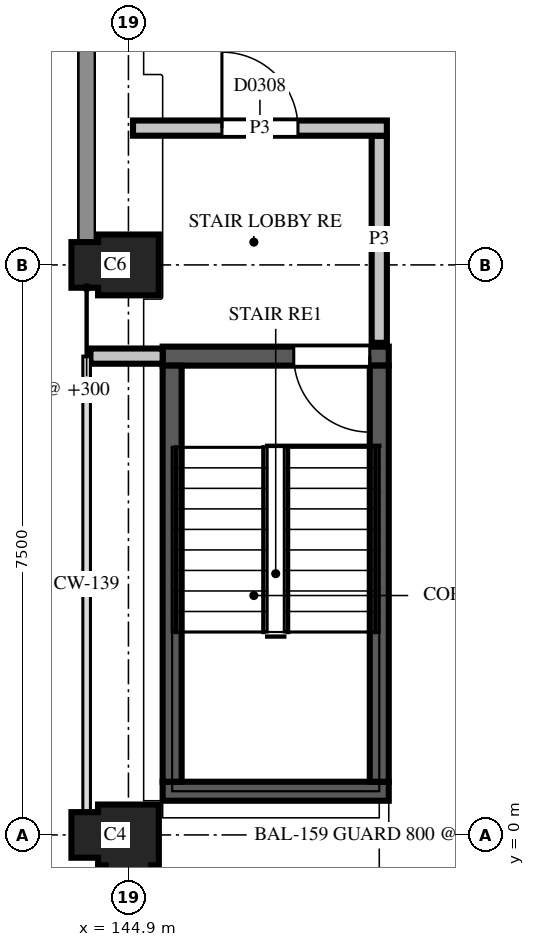
"""IFC4 building model, lengths in metres.
Left out: names, types, materials, properties, quantities, classifications, styles, units other than length and angle.
Written with IfcOpenShell. Run it as: python <this file> out.ifc"""

import sys

from ifc_helpers import new_model, si_unit, direction, frame, frame_2d, origin, place, context, subcontext, project, spatial, polyline, rectangle, outline, extrude, element, fill, save


model = new_model("IFC4")
c1 = context("Model", 3, precision=1e-05, world=origin(), true_north=direction((0.0, 1.0)))
c2 = subcontext(c1, "Body", "Model", "MODEL_VIEW")
j1 = project(units=[si_unit("LENGTHUNIT", "METRE"), si_unit("PLANEANGLEUNIT", "RADIAN")], contexts=[c1])
p1 = place(None, origin())
s1 = spatial("IfcSite", under=j1, at=p1, CompositionType="ELEMENT")
p2 = place(p1, origin())
s2 = spatial("IfcBuilding", under=s1, at=p2, CompositionType="ELEMENT")
p3 = place(p2, frame((0.0, 0.0, 11.9)))
s3 = spatial("IfcBuildingStorey", under=s2, at=p3, CompositionType="ELEMENT", Elevation=11.9)
p4 = place(p3, frame((144.9, 0.0, 0.0), z_axis=(0.0, 0.0, 1.0), x_axis=(-1.0, 0.0, 0.0)))
e1 = element("IfcColumn", 1, at=p4, inside=s3, PredefinedType="COLUMN", context=c2, shape_type="SweptSolid", body=[
    extrude(outline(polyline([(-0.4, -0.4), (0.4, -0.4), (0.4, -0.3), (0.75, -0.3), (0.75, 0.3), (0.4, 0.3), (0.4, 0.4), (0.3, 0.4), (0.3, 0.75), (-0.3, 0.75), (-0.3, 0.4), (-0.4, 0.4), (-0.4, -0.4)])), origin(), (0.0, 0.0, 1.0), 3.7),
])
p5 = place(p3, frame((144.9, 7.5, 0.0), z_axis=(0.0, 0.0, 1.0), x_axis=(-1.0, 0.0, 0.0)))
e2 = element("IfcColumn", 2, at=p5, inside=s3, PredefinedType="COLUMN", context=c2, shape_type="SweptSolid", body=[
    extrude(outline(polyline([(-0.4, -0.4), (0.4, -0.4), (0.4, -0.3), (0.75, -0.3), (0.75, 0.3), (0.4, 0.3), (0.4, 0.4), (-0.4, 0.4), (-0.4, -0.4)])), origin(), (0.0, 0.0, 1.0), 3.7),
])
p6 = place(p3, frame((145.35, 0.575, 0.0), z_axis=(0.0, 0.0, 1.0), x_axis=(1.0, 0.0, 0.0)))
e3 = element("IfcWall", 3, at=p6, inside=s3, PredefinedType="SHEAR", context=c2, shape_type="SweptSolid", body=[
    extrude(rectangle(XDim=2.975, YDim=0.25, at=frame_2d((1.487, 0.0))), origin(), (0.0, 0.0, 1.0), 3.7),
])
p7 = place(p3, frame((145.35, 6.3, 0.0), z_axis=(0.0, 0.0, 1.0), x_axis=(1.0, 0.0, 0.0)))
e4 = element("IfcWall", 4, at=p7, inside=s3, PredefinedType="SHEAR", context=c2, shape_type="SweptSolid", body=[
    extrude(rectangle(XDim=2.975, YDim=0.25, at=frame_2d((1.487, 0.0))), origin(), (0.0, 0.0, 1.0), 3.7),
])
p8 = place(p7, frame((1.725, 0.0, 0.0)))
e5 = element("IfcOpeningElement", 5, at=p8, cuts=e4, PredefinedType="OPENING", context=c2, shape_type="SweptSolid", body=[
    extrude(rectangle(XDim=1.0, YDim=2.1, at=frame_2d((0.5, 1.05))), frame((0.0, 0.135, 0.0), z_axis=(0.0, -1.0, 0.0), x_axis=(1.0, 0.0, 0.0)), (0.0, 0.0, 1.0), 0.27),
])
for number, where, z_axis, x_axis in (
    (6, (145.475, 0.7, 0.0), (0.0, 0.0, 1.0), (0.0, 1.0, 0.0)),
    (7, (148.2, 0.7, 0.0), (0.0, 0.0, 1.0), (0.0, 1.0, 0.0)),
):
    element("IfcWall", number, at=place(p3, frame(where, z_axis=z_axis, x_axis=x_axis)), inside=s3, PredefinedType="SHEAR", context=c2, shape_type="SweptSolid", body=[
        extrude(rectangle(XDim=5.475, YDim=0.25, at=frame_2d((2.738, 0.0))), origin(), (0.0, 0.0, 1.0), 3.7),
    ])
p9 = place(p3, frame((144.4, 6.3, 0.0), z_axis=(0.0, 0.0, 1.0), x_axis=(1.0, 0.0, 0.0)))
e8 = element("IfcWall", 8, at=p9, inside=s3, PredefinedType="PARTITIONING", context=c2, shape_type="SweptSolid", body=[
    extrude(rectangle(XDim=0.95, YDim=0.2, at=frame_2d((0.475, 0.0))), origin(), (0.0, 0.0, 1.0), 2.88),
])
p10 = place(p3, frame((148.2, 6.475, 0.0), z_axis=(0.0, 0.0, 1.0), x_axis=(0.0, 1.0, 0.0)))
e9 = element("IfcWall", 9, at=p10, inside=s3, PredefinedType="PARTITIONING", context=c2, shape_type="SweptSolid", body=[
    extrude(rectangle(XDim=2.725, YDim=0.2, at=frame_2d((1.362, 0.0))), origin(), (0.0, 0.0, 1.0), 2.88),
])
p11 = place(p3, frame((148.3, 9.3, 0.0), z_axis=(0.0, 0.0, 1.0), x_axis=(-1.0, 0.0, 0.0)))
e10 = element("IfcWall", 10, at=p11, inside=s3, PredefinedType="PARTITIONING", context=c2, shape_type="SweptSolid", body=[
    extrude(rectangle(XDim=3.34, YDim=0.2, at=frame_2d((1.67, 0.0))), origin(), (0.0, 0.0, 1.0), 2.88),
])
p12 = place(p11, frame((1.17, 0.0, 0.0)))
e11 = element("IfcOpeningElement", 11, at=p12, cuts=e10, PredefinedType="OPENING", context=c2, shape_type="SweptSolid", body=[
    extrude(rectangle(XDim=1.0, YDim=2.1, at=frame_2d((0.5, 1.05))), frame((0.0, 0.11, 0.0), z_axis=(0.0, -1.0, 0.0), x_axis=(1.0, 0.0, 0.0)), (0.0, 0.0, 1.0), 0.22),
])
p13 = place(p12, origin())
e12 = element("IfcDoor", 12, at=p13, inside=s3, OperationType="SINGLE_SWING_RIGHT", PredefinedType="DOOR", context=c2, shape_type="SweptSolid", body=[
    extrude(rectangle(XDim=1.0, YDim=2.1, at=frame_2d((0.5, 1.05))), frame((0.0, 0.025, 0.0), z_axis=(0.0, -1.0, 0.0), x_axis=(1.0, 0.0, 0.0)), (0.0, 0.0, 1.0), 0.05),
])
fill(e11, e12)
p14 = place(p8, origin())
e13 = element("IfcDoor", 13, at=p14, inside=s3, OperationType="SINGLE_SWING_RIGHT", PredefinedType="DOOR", context=c2, shape_type="SweptSolid", body=[
    extrude(rectangle(XDim=1.0, YDim=2.1, at=frame_2d((0.5, 1.05))), frame((0.0, 0.025, 0.0), z_axis=(0.0, -1.0, 0.0), x_axis=(1.0, 0.0, 0.0)), (0.0, 0.0, 1.0), 0.05),
])
fill(e5, e13)
save(model, sys.argv[1])
